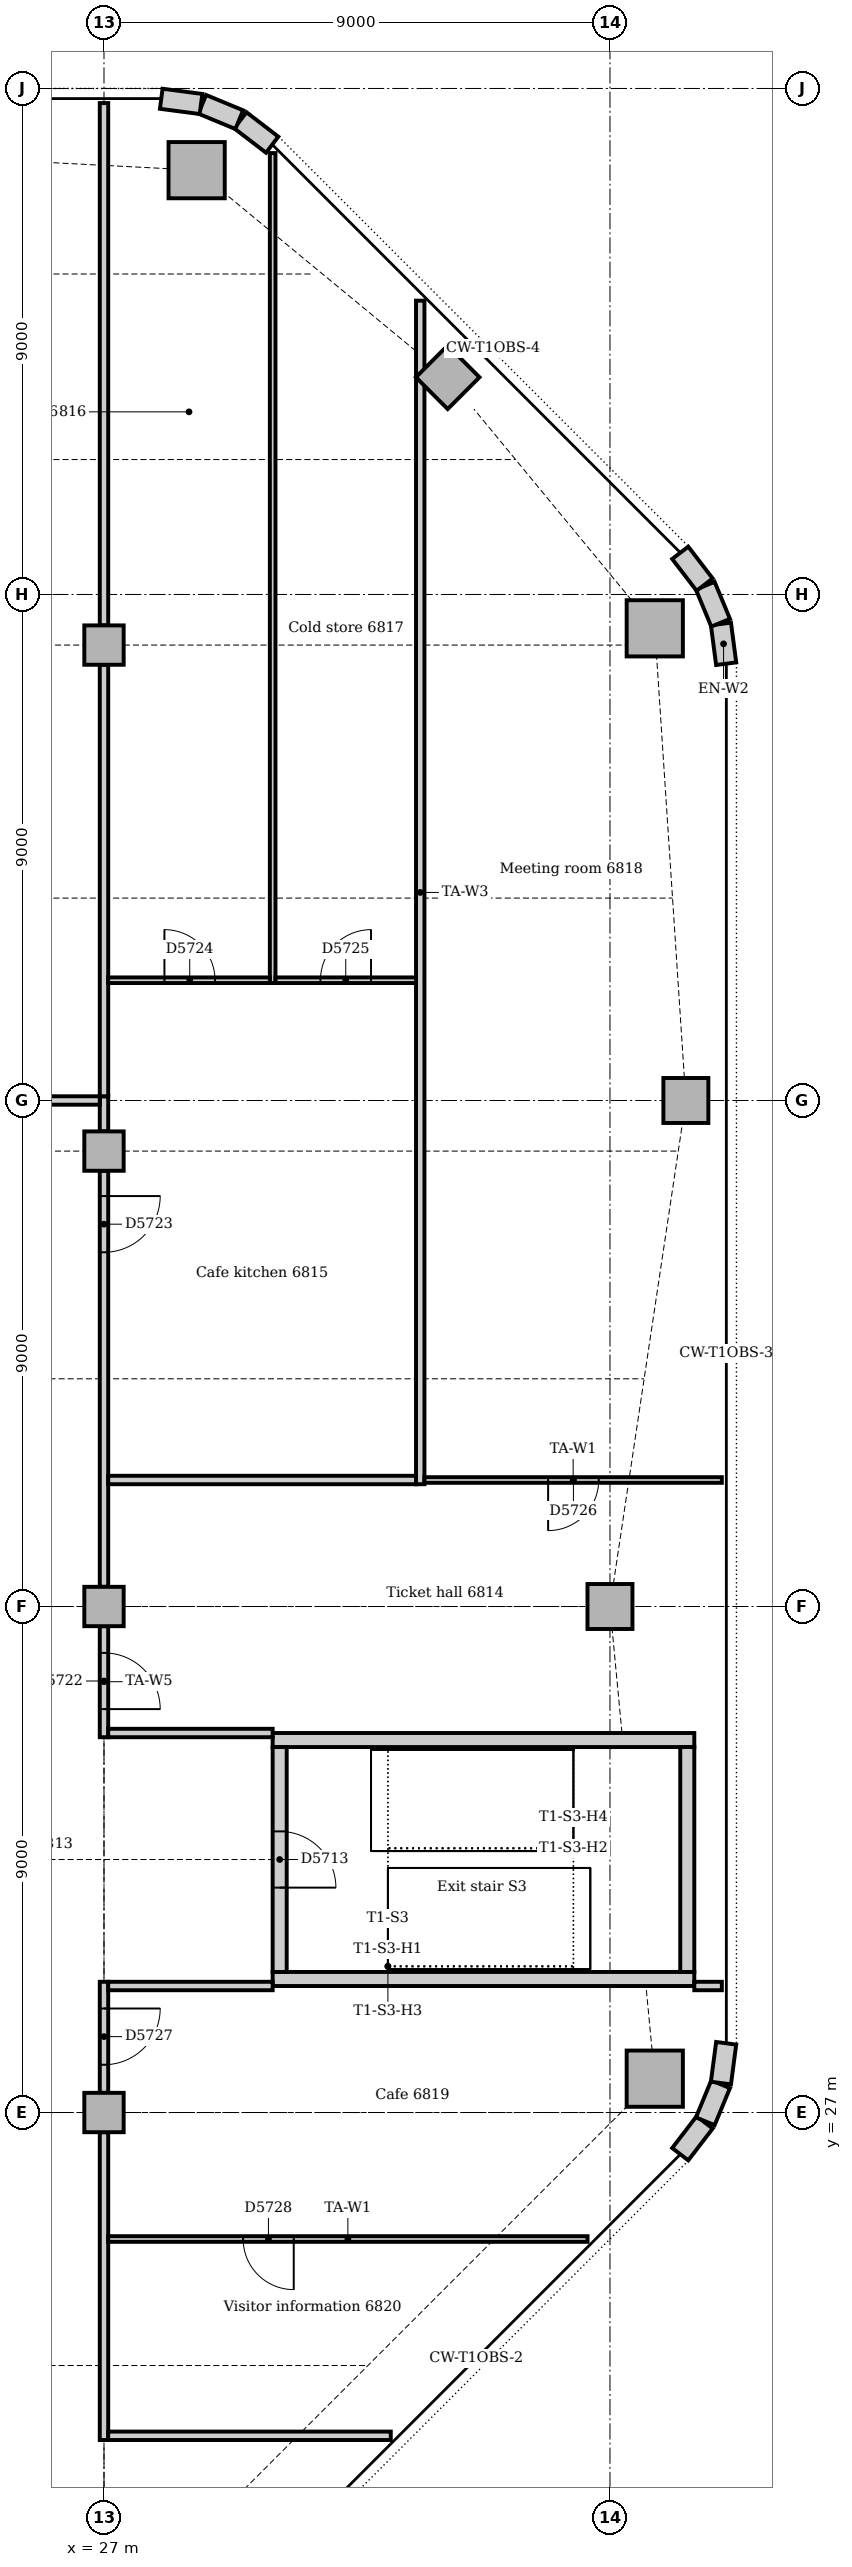
"""IFC4 building model, lengths in metres.
Left out: names, types, materials, properties, quantities, classifications, styles, units other than length and angle.
Written with IfcOpenShell. Run it as: python <this file> out.ifc"""

import sys

from ifc_helpers import new_model, si_unit, direction, frame, frame_2d, origin, origin_2d, place, context, subcontext, project, spatial, rectangle, extrude, element, fill, save


model = new_model("IFC4")
c1 = context("Model", 3, precision=1e-05, world=origin(), true_north=direction((0.0, 1.0)))
c2 = subcontext(c1, "Body", "Model", "MODEL_VIEW")
j1 = project(units=[si_unit("LENGTHUNIT", "METRE"), si_unit("PLANEANGLEUNIT", "RADIAN")], contexts=[c1])
p1 = place(None, origin())
s1 = spatial("IfcSite", under=j1, at=p1, CompositionType="ELEMENT")
p2 = place(p1, origin())
s2 = spatial("IfcBuilding", under=s1, at=p2, CompositionType="ELEMENT")
p3 = place(p2, frame((0.0, 0.0, 283.0)))
s3 = spatial("IfcBuildingStorey", under=s2, at=p3, CompositionType="ELEMENT", Elevation=283.0)
for number, where, z_axis, x_axis in (
    (1, (30.0, 29.375, 0.0), (0.0, 0.0, 1.0), (1.0, 0.0, 0.0)),
    (2, (37.5, 33.625, 0.0), (0.0, 0.0, 1.0), (-1.0, 0.0, 0.0)),
):
    element("IfcWall", number, at=place(p3, frame(where, z_axis=z_axis, x_axis=x_axis)), inside=s3, PredefinedType="SOLIDWALL", context=c2, shape_type="SweptSolid", body=[
        extrude(rectangle(XDim=7.5, YDim=0.25, at=frame_2d((3.75, 0.0))), origin(), (0.0, 0.0, 1.0), 8.0),
    ])
p4 = place(p3, frame((37.375, 29.5, 0.0), z_axis=(0.0, 0.0, 1.0), x_axis=(0.0, 1.0, 0.0)))
e3 = element("IfcWall", 3, at=p4, inside=s3, PredefinedType="SOLIDWALL", context=c2, shape_type="SweptSolid", body=[
    extrude(rectangle(XDim=4.0, YDim=0.25, at=frame_2d((2.0, 0.0))), origin(), (0.0, 0.0, 1.0), 8.0),
])
p5 = place(p3, frame((30.125, 33.5, 0.0), z_axis=(0.0, 0.0, 1.0), x_axis=(0.0, -1.0, 0.0)))
e4 = element("IfcWall", 4, at=p5, inside=s3, PredefinedType="SOLIDWALL", context=c2, shape_type="SweptSolid", body=[
    extrude(rectangle(XDim=4.0, YDim=0.25, at=frame_2d((2.0, 0.0))), origin(), (0.0, 0.0, 1.0), 8.0),
])
p6 = place(p5, frame((1.5, 0.0, 0.0)))
e5 = element("IfcOpeningElement", 5, at=p6, cuts=e4, PredefinedType="OPENING", context=c2, shape_type="SweptSolid", body=[
    extrude(rectangle(XDim=1.0, YDim=2.1, at=frame_2d((0.5, 1.05))), frame((0.0, 0.135, 0.0), z_axis=(0.0, -1.0, 0.0), x_axis=(1.0, 0.0, 0.0)), (0.0, 0.0, 1.0), 0.27),
])
for number, where, z_axis, x_axis in (
    (6, (36.797, 27.602, 0.0), (0.0, 0.0, 1.0), (1.0, 0.0, 0.0)),
    (7, (36.797, 53.398, 0.0), (0.0, 0.0, 1.0), (1.0, 0.0, 0.0)),
    (8, (28.648, 61.547, 0.0), (0.0, 0.0, 1.0), (1.0, 0.0, 0.0)),
):
    element("IfcColumn", number, at=place(p3, frame(where, z_axis=z_axis, x_axis=x_axis)), inside=s3, PredefinedType="COLUMN", context=c2, shape_type="SweptSolid", body=[
        extrude(rectangle(XDim=1.0, YDim=1.0, at=origin_2d()), origin(), (0.0, 0.0, 1.0), 7.7),
    ])
for number, where, z_axis, x_axis in (
    (9, (36.0, 36.0, 0.0), (0.0, 0.0, 1.0), (1.0, 0.0, 0.0)),
    (10, (37.35, 45.0, 0.0), (0.0, 0.0, 1.0), (1.0, 0.0, 0.0)),
    (11, (33.114, 57.864, 0.0), (0.0, 0.0, 1.0), (0.707, 0.707, 0.0)),
):
    element("IfcColumn", number, at=place(p3, frame(where, z_axis=z_axis, x_axis=x_axis)), inside=s3, PredefinedType="COLUMN", context=c2, shape_type="SweptSolid", body=[
        extrude(rectangle(XDim=0.8, YDim=0.8, at=origin_2d()), origin(), (0.0, 0.0, 1.0), 7.7),
    ])
for number, where, z_axis, x_axis in (
    (12, (27.0, 27.0, 0.0), (0.0, 0.0, 1.0), (1.0, 0.0, 0.0)),
    (13, (27.0, 36.0, 0.0), (0.0, 0.0, 1.0), (1.0, 0.0, 0.0)),
    (14, (27.0, 44.1, 0.0), (0.0, 0.0, 1.0), (1.0, 0.0, 0.0)),
    (15, (27.0, 53.1, 0.0), (0.0, 0.0, 1.0), (1.0, 0.0, 0.0)),
):
    element("IfcColumn", number, at=place(p3, frame(where, z_axis=z_axis, x_axis=x_axis)), inside=s3, PredefinedType="COLUMN", context=c2, shape_type="SweptSolid", body=[
        extrude(rectangle(XDim=0.7, YDim=0.7, at=origin_2d()), origin(), (0.0, 0.0, 1.0), 7.7),
    ])
p7 = place(p3, frame((37.25, 26.259, 0.0), z_axis=(0.0, 0.0, 1.0), x_axis=(0.608802368033, 0.793321924995, 0.0)))
e16 = element("IfcWall", 16, at=p7, inside=s3, PredefinedType="STANDARD", context=c2, shape_type="SweptSolid", body=[
    extrude(rectangle(XDim=0.713, YDim=0.36, at=frame_2d((0.357, 0.0))), origin(), (0.0, 0.0, 1.0), 7.7),
])
for number, where, z_axis, x_axis in (
    (17, (37.695, 26.844, 0.0), (0.0, 0.0, 1.0), (0.383, 0.924, 0.0)),
    (18, (37.974, 27.524, 0.0), (0.0, 0.0, 1.0), (0.131, 0.991, 0.0)),
    (19, (38.067, 52.769, 0.0), (0.0, 0.0, 1.0), (-0.131, 0.991, 0.0)),
    (20, (37.968, 53.497, 0.0), (0.0, 0.0, 1.0), (-0.383, 0.924, 0.0)),
):
    element("IfcWall", number, at=place(p3, frame(where, z_axis=z_axis, x_axis=x_axis)), inside=s3, PredefinedType="STANDARD", context=c2, shape_type="SweptSolid", body=[
        extrude(rectangle(XDim=0.713, YDim=0.36, at=frame_2d((0.356, 0.0))), origin(), (0.0, 0.0, 1.0), 7.7),
    ])
for number, where, z_axis, x_axis in (
    (21, (37.684, 54.175, 0.0), (0.0, 0.0, 1.0), (-0.609, 0.793, 0.0)),
    (22, (29.991, 62.0, 0.0), (0.0, 0.0, 1.0), (-0.793, 0.609, 0.0)),
):
    element("IfcWall", number, at=place(p3, frame(where, z_axis=z_axis, x_axis=x_axis)), inside=s3, PredefinedType="STANDARD", context=c2, shape_type="SweptSolid", body=[
        extrude(rectangle(XDim=0.713, YDim=0.36, at=frame_2d((0.357, 0.0))), origin(), (0.0, 0.0, 1.0), 7.7),
    ])
for number, where, z_axis, x_axis in (
    (23, (29.406, 62.445, 0.0), (0.0, 0.0, 1.0), (-0.924, 0.383, 0.0)),
    (24, (28.726, 62.724, 0.0), (0.0, 0.0, 1.0), (-0.991, 0.131, 0.0)),
):
    element("IfcWall", number, at=place(p3, frame(where, z_axis=z_axis, x_axis=x_axis)), inside=s3, PredefinedType="STANDARD", context=c2, shape_type="SweptSolid", body=[
        extrude(rectangle(XDim=0.713, YDim=0.36, at=frame_2d((0.356, 0.0))), origin(), (0.0, 0.0, 1.0), 7.7),
    ])
p8 = place(p3, frame((27.0, 33.675, 0.0), z_axis=(0.0, 0.0, 1.0), x_axis=(0.0, 1.0, 0.0)))
e25 = element("IfcWall", 25, at=p8, inside=s3, PredefinedType="PARTITIONING", context=c2, shape_type="SweptSolid", body=[
    extrude(rectangle(XDim=1.975, YDim=0.15, at=frame_2d((0.988, 0.0))), origin(), (0.0, 0.0, 1.0), 7.25),
])
p9 = place(p8, frame((0.5, 0.0, 0.0)))
e26 = element("IfcOpeningElement", 26, at=p9, cuts=e25, PredefinedType="OPENING", context=c2, shape_type="SweptSolid", body=[
    extrude(rectangle(XDim=1.0, YDim=2.1, at=frame_2d((0.5, 1.05))), frame((0.0, 0.085, 0.0), z_axis=(0.0, -1.0, 0.0), x_axis=(1.0, 0.0, 0.0)), (0.0, 0.0, 1.0), 0.17),
])
p10 = place(p3, frame((27.0, 36.35, 0.0), z_axis=(0.0, 0.0, 1.0), x_axis=(0.0, 1.0, 0.0)))
e27 = element("IfcWall", 27, at=p10, inside=s3, PredefinedType="PARTITIONING", context=c2, shape_type="SweptSolid", body=[
    extrude(rectangle(XDim=7.4, YDim=0.15, at=frame_2d((3.7, 0.0))), origin(), (0.0, 0.0, 1.0), 7.25),
])
p11 = place(p10, frame((5.95, 0.0, 0.0)))
e28 = element("IfcOpeningElement", 28, at=p11, cuts=e27, PredefinedType="OPENING", context=c2, shape_type="SweptSolid", body=[
    extrude(rectangle(XDim=1.0, YDim=2.1, at=frame_2d((0.5, 1.05))), frame((0.0, 0.085, 0.0), z_axis=(0.0, -1.0, 0.0), x_axis=(1.0, 0.0, 0.0)), (0.0, 0.0, 1.0), 0.17),
])
p12 = place(p3, frame((27.0, 44.45, 0.0), z_axis=(0.0, 0.0, 1.0), x_axis=(0.0, 1.0, 0.0)))
e29 = element("IfcWall", 29, at=p12, inside=s3, PredefinedType="PARTITIONING", context=c2, shape_type="SweptSolid", body=[
    extrude(rectangle(XDim=0.625, YDim=0.15, at=frame_2d((0.312, 0.0))), origin(), (0.0, 0.0, 1.0), 7.25),
])
p13 = place(p3, frame((27.0, 21.175, 0.0), z_axis=(0.0, 0.0, 1.0), x_axis=(0.0, 1.0, 0.0)))
e30 = element("IfcWall", 30, at=p13, inside=s3, PredefinedType="PARTITIONING", context=c2, shape_type="SweptSolid", body=[
    extrude(rectangle(XDim=5.475, YDim=0.15, at=frame_2d((2.737, 0.0))), origin(), (0.0, 0.0, 1.0), 7.25),
])
p14 = place(p3, frame((27.0, 27.35, 0.0), z_axis=(0.0, 0.0, 1.0), x_axis=(0.0, 1.0, 0.0)))
e31 = element("IfcWall", 31, at=p14, inside=s3, PredefinedType="PARTITIONING", context=c2, shape_type="SweptSolid", body=[
    extrude(rectangle(XDim=1.975, YDim=0.15, at=frame_2d((0.988, 0.0))), origin(), (0.0, 0.0, 1.0), 7.25),
])
p15 = place(p14, frame((0.5, 0.0, 0.0)))
e32 = element("IfcOpeningElement", 32, at=p15, cuts=e31, PredefinedType="OPENING", context=c2, shape_type="SweptSolid", body=[
    extrude(rectangle(XDim=1.0, YDim=2.1, at=frame_2d((0.5, 1.05))), frame((0.0, 0.085, 0.0), z_axis=(0.0, -1.0, 0.0), x_axis=(1.0, 0.0, 0.0)), (0.0, 0.0, 1.0), 0.17),
])
p16 = place(p3, frame((27.075, 21.25, 0.0), z_axis=(0.0, 0.0, 1.0), x_axis=(1.0, 0.0, 0.0)))
e33 = element("IfcWall", 33, at=p16, inside=s3, PredefinedType="PARTITIONING", context=c2, shape_type="SweptSolid", body=[
    extrude(rectangle(XDim=5.026, YDim=0.15, at=frame_2d((2.513, 0.0))), origin(), (0.0, 0.0, 1.0), 7.7),
])
p17 = place(p3, frame((22.425, 45.0, 0.0), z_axis=(0.0, 0.0, 1.0), x_axis=(1.0, 0.0, 0.0)))
e34 = element("IfcWall", 34, at=p17, inside=s3, PredefinedType="PARTITIONING", context=c2, shape_type="SweptSolid", body=[
    extrude(rectangle(XDim=4.5, YDim=0.15, at=frame_2d((2.25, 0.0))), origin(), (0.0, 0.0, 1.0), 7.7),
])
p18 = place(p17, frame((1.75, 0.0, 0.0)))
e35 = element("IfcOpeningElement", 35, at=p18, cuts=e34, PredefinedType="OPENING", context=c2, shape_type="SweptSolid", body=[
    extrude(rectangle(XDim=1.0, YDim=2.1, at=frame_2d((0.5, 1.05))), frame((0.0, 0.085, 0.0), z_axis=(0.0, -1.0, 0.0), x_axis=(1.0, 0.0, 0.0)), (0.0, 0.0, 1.0), 0.17),
])
for number, where, z_axis, x_axis in (
    (36, (27.075, 29.25, 0.0), (0.0, 0.0, 1.0), (1.0, 0.0, 0.0)),
    (37, (27.075, 33.75, 0.0), (0.0, 0.0, 1.0), (1.0, 0.0, 0.0)),
):
    element("IfcWall", number, at=place(p3, frame(where, z_axis=z_axis, x_axis=x_axis)), inside=s3, PredefinedType="PARTITIONING", context=c2, shape_type="SweptSolid", body=[
        extrude(rectangle(XDim=2.925, YDim=0.15, at=frame_2d((1.462, 0.0))), origin(), (0.0, 0.0, 1.0), 7.7),
    ])
p19 = place(p3, frame((32.625, 38.175, 0.0), z_axis=(0.0, 0.0, 1.0), x_axis=(0.0, 1.0, 0.0)))
e38 = element("IfcWall", 38, at=p19, inside=s3, PredefinedType="PARTITIONING", context=c2, shape_type="SweptSolid", body=[
    extrude(rectangle(XDim=21.051, YDim=0.15, at=frame_2d((10.525, 0.0))), origin(), (0.0, 0.0, 1.0), 7.7),
])
p20 = place(p3, frame((27.0, 53.45, 0.0), z_axis=(0.0, 0.0, 1.0), x_axis=(0.0, 1.0, 0.0)))
e39 = element("IfcWall", 39, at=p20, inside=s3, PredefinedType="PARTITIONING", context=c2, shape_type="SweptSolid", body=[
    extrude(rectangle(XDim=9.29, YDim=0.15, at=frame_2d((4.645, 0.0))), origin(), (0.0, 0.0, 1.0), 7.25),
])
p21 = place(p3, frame((27.0, 45.075, 0.0), z_axis=(0.0, 0.0, 1.0), x_axis=(0.0, 1.0, 0.0)))
e40 = element("IfcWall", 40, at=p21, inside=s3, PredefinedType="PARTITIONING", context=c2, shape_type="SweptSolid", body=[
    extrude(rectangle(XDim=7.675, YDim=0.15, at=frame_2d((3.837, 0.0))), origin(), (0.0, 0.0, 1.0), 7.25),
])
p22 = place(p3, frame((27.075, 38.25, 0.0), z_axis=(0.0, 0.0, 1.0), x_axis=(1.0, 0.0, 0.0)))
e41 = element("IfcWall", 41, at=p22, inside=s3, PredefinedType="PARTITIONING", context=c2, shape_type="SweptSolid", body=[
    extrude(rectangle(XDim=5.475, YDim=0.15, at=frame_2d((2.737, 0.0))), origin(), (0.0, 0.0, 1.0), 7.7),
])
p23 = place(p3, frame((37.5, 29.25, 0.0), z_axis=(0.0, 0.0, 1.0), x_axis=(1.0, 0.0, 0.0)))
e42 = element("IfcWall", 42, at=p23, inside=s3, PredefinedType="PARTITIONING", context=c2, shape_type="SweptSolid", body=[
    extrude(rectangle(XDim=0.49, YDim=0.15, at=frame_2d((0.245, 0.0))), origin(), (0.0, 0.0, 1.0), 7.7),
])
p24 = place(p3, frame((30.0, 47.089, 0.0), z_axis=(0.0, 0.0, 1.0), x_axis=(0.0, 1.0, 0.0)))
e43 = element("IfcWall", 43, at=p24, inside=s3, PredefinedType="PARTITIONING", context=c2, shape_type="SweptSolid", body=[
    extrude(rectangle(XDim=14.762, YDim=0.1, at=frame_2d((7.381, 0.0))), origin(), (0.0, 0.0, 1.0), 7.7),
])
p25 = place(p3, frame((27.075, 24.75, 0.0), z_axis=(0.0, 0.0, 1.0), x_axis=(1.0, 0.0, 0.0)))
e44 = element("IfcWall", 44, at=p25, inside=s3, PredefinedType="PARTITIONING", context=c2, shape_type="SweptSolid", body=[
    extrude(rectangle(XDim=8.526, YDim=0.1, at=frame_2d((4.263, 0.0))), origin(), (0.0, 0.0, 1.0), 7.7),
])
p26 = place(p25, frame((2.4, 0.0, 0.0)))
e45 = element("IfcOpeningElement", 45, at=p26, cuts=e44, PredefinedType="OPENING", context=c2, shape_type="SweptSolid", body=[
    extrude(rectangle(XDim=0.9, YDim=2.1, at=frame_2d((0.45, 1.05))), frame((0.0, 0.06, 0.0), z_axis=(0.0, -1.0, 0.0), x_axis=(1.0, 0.0, 0.0)), (0.0, 0.0, 1.0), 0.12),
])
p27 = place(p3, frame((27.075, 47.139, 0.0), z_axis=(0.0, 0.0, 1.0), x_axis=(1.0, 0.0, 0.0)))
e46 = element("IfcWall", 46, at=p27, inside=s3, PredefinedType="PARTITIONING", context=c2, shape_type="SweptSolid", body=[
    extrude(rectangle(XDim=2.875, YDim=0.1, at=frame_2d((1.438, 0.0))), origin(), (0.0, 0.0, 1.0), 7.7),
])
p28 = place(p27, frame((1.0, 0.0, 0.0)))
e47 = element("IfcOpeningElement", 47, at=p28, cuts=e46, PredefinedType="OPENING", context=c2, shape_type="SweptSolid", body=[
    extrude(rectangle(XDim=0.9, YDim=2.1, at=frame_2d((0.45, 1.05))), frame((0.0, 0.06, 0.0), z_axis=(0.0, -1.0, 0.0), x_axis=(1.0, 0.0, 0.0)), (0.0, 0.0, 1.0), 0.12),
])
p29 = place(p3, frame((30.05, 47.139, 0.0), z_axis=(0.0, 0.0, 1.0), x_axis=(1.0, 0.0, 0.0)))
e48 = element("IfcWall", 48, at=p29, inside=s3, PredefinedType="PARTITIONING", context=c2, shape_type="SweptSolid", body=[
    extrude(rectangle(XDim=2.5, YDim=0.1, at=frame_2d((1.25, 0.0))), origin(), (0.0, 0.0, 1.0), 7.7),
])
p30 = place(p29, frame((0.8, 0.0, 0.0)))
e49 = element("IfcOpeningElement", 49, at=p30, cuts=e48, PredefinedType="OPENING", context=c2, shape_type="SweptSolid", body=[
    extrude(rectangle(XDim=0.9, YDim=2.1, at=frame_2d((0.45, 1.05))), frame((0.0, 0.06, 0.0), z_axis=(0.0, -1.0, 0.0), x_axis=(1.0, 0.0, 0.0)), (0.0, 0.0, 1.0), 0.12),
])
p31 = place(p3, frame((32.7, 38.25, 0.0), z_axis=(0.0, 0.0, 1.0), x_axis=(1.0, 0.0, 0.0)))
e50 = element("IfcWall", 50, at=p31, inside=s3, PredefinedType="PARTITIONING", context=c2, shape_type="SweptSolid", body=[
    extrude(rectangle(XDim=5.29, YDim=0.1, at=frame_2d((2.645, 0.0))), origin(), (0.0, 0.0, 1.0), 7.7),
])
p32 = place(p31, frame((2.2, 0.0, 0.0)))
e51 = element("IfcOpeningElement", 51, at=p32, cuts=e50, PredefinedType="OPENING", context=c2, shape_type="SweptSolid", body=[
    extrude(rectangle(XDim=0.9, YDim=2.1, at=frame_2d((0.45, 1.05))), frame((0.0, 0.06, 0.0), z_axis=(0.0, -1.0, 0.0), x_axis=(1.0, 0.0, 0.0)), (0.0, 0.0, 1.0), 0.12),
])
p33 = place(p6, origin())
e52 = element("IfcDoor", 52, at=p33, inside=s3, OperationType="SINGLE_SWING_RIGHT", PredefinedType="DOOR", context=c2, shape_type="SweptSolid", body=[
    extrude(rectangle(XDim=1.0, YDim=2.1, at=frame_2d((0.5, 1.05))), frame((0.0, 0.025, 0.0), z_axis=(0.0, -1.0, 0.0), x_axis=(1.0, 0.0, 0.0)), (0.0, 0.0, 1.0), 0.05),
])
fill(e5, e52)
p34 = place(p9, frame((1.0, 0.0, 0.0), z_axis=(0.0, 0.0, 1.0), x_axis=(-1.0, 0.0, 0.0)))
e53 = element("IfcDoor", 53, at=p34, inside=s3, OperationType="SINGLE_SWING_RIGHT", PredefinedType="DOOR", context=c2, shape_type="SweptSolid", body=[
    extrude(rectangle(XDim=1.0, YDim=2.1, at=frame_2d((0.5, 1.05))), frame((0.0, 0.025, 0.0), z_axis=(0.0, -1.0, 0.0), x_axis=(1.0, 0.0, 0.0)), (0.0, 0.0, 1.0), 0.05),
])
fill(e26, e53)
p35 = place(p11, frame((1.0, 0.0, 0.0), z_axis=(0.0, 0.0, 1.0), x_axis=(-1.0, 0.0, 0.0)))
e54 = element("IfcDoor", 54, at=p35, inside=s3, OperationType="SINGLE_SWING_LEFT", PredefinedType="DOOR", context=c2, shape_type="SweptSolid", body=[
    extrude(rectangle(XDim=1.0, YDim=2.1, at=frame_2d((0.5, 1.05))), frame((0.0, 0.025, 0.0), z_axis=(0.0, -1.0, 0.0), x_axis=(1.0, 0.0, 0.0)), (0.0, 0.0, 1.0), 0.05),
])
fill(e28, e54)
p36 = place(p28, origin())
e55 = element("IfcDoor", 55, at=p36, inside=s3, OperationType="SINGLE_SWING_LEFT", PredefinedType="DOOR", context=c2, shape_type="SweptSolid", body=[
    extrude(rectangle(XDim=0.9, YDim=2.1, at=frame_2d((0.45, 1.05))), frame((0.0, 0.025, 0.0), z_axis=(0.0, -1.0, 0.0), x_axis=(1.0, 0.0, 0.0)), (0.0, 0.0, 1.0), 0.05),
])
fill(e47, e55)
p37 = place(p30, origin())
e56 = element("IfcDoor", 56, at=p37, inside=s3, OperationType="SINGLE_SWING_RIGHT", PredefinedType="DOOR", context=c2, shape_type="SweptSolid", body=[
    extrude(rectangle(XDim=0.9, YDim=2.1, at=frame_2d((0.45, 1.05))), frame((0.0, 0.025, 0.0), z_axis=(0.0, -1.0, 0.0), x_axis=(1.0, 0.0, 0.0)), (0.0, 0.0, 1.0), 0.05),
])
fill(e49, e56)
p38 = place(p32, frame((0.9, 0.0, 0.0), z_axis=(0.0, 0.0, 1.0), x_axis=(-1.0, 0.0, 0.0)))
e57 = element("IfcDoor", 57, at=p38, inside=s3, OperationType="SINGLE_SWING_RIGHT", PredefinedType="DOOR", context=c2, shape_type="SweptSolid", body=[
    extrude(rectangle(XDim=0.9, YDim=2.1, at=frame_2d((0.45, 1.05))), frame((0.0, 0.025, 0.0), z_axis=(0.0, -1.0, 0.0), x_axis=(1.0, 0.0, 0.0)), (0.0, 0.0, 1.0), 0.05),
])
fill(e51, e57)
p39 = place(p15, frame((1.0, 0.0, 0.0), z_axis=(0.0, 0.0, 1.0), x_axis=(-1.0, 0.0, 0.0)))
e58 = element("IfcDoor", 58, at=p39, inside=s3, OperationType="SINGLE_SWING_LEFT", PredefinedType="DOOR", context=c2, shape_type="SweptSolid", body=[
    extrude(rectangle(XDim=1.0, YDim=2.1, at=frame_2d((0.5, 1.05))), frame((0.0, 0.025, 0.0), z_axis=(0.0, -1.0, 0.0), x_axis=(1.0, 0.0, 0.0)), (0.0, 0.0, 1.0), 0.05),
])
fill(e32, e58)
p40 = place(p26, frame((0.9, 0.0, 0.0), z_axis=(0.0, 0.0, 1.0), x_axis=(-1.0, 0.0, 0.0)))
e59 = element("IfcDoor", 59, at=p40, inside=s3, OperationType="SINGLE_SWING_LEFT", PredefinedType="DOOR", context=c2, shape_type="SweptSolid", body=[
    extrude(rectangle(XDim=0.9, YDim=2.1, at=frame_2d((0.45, 1.05))), frame((0.0, 0.025, 0.0), z_axis=(0.0, -1.0, 0.0), x_axis=(1.0, 0.0, 0.0)), (0.0, 0.0, 1.0), 0.05),
])
fill(e45, e59)
save(model, sys.argv[1])
